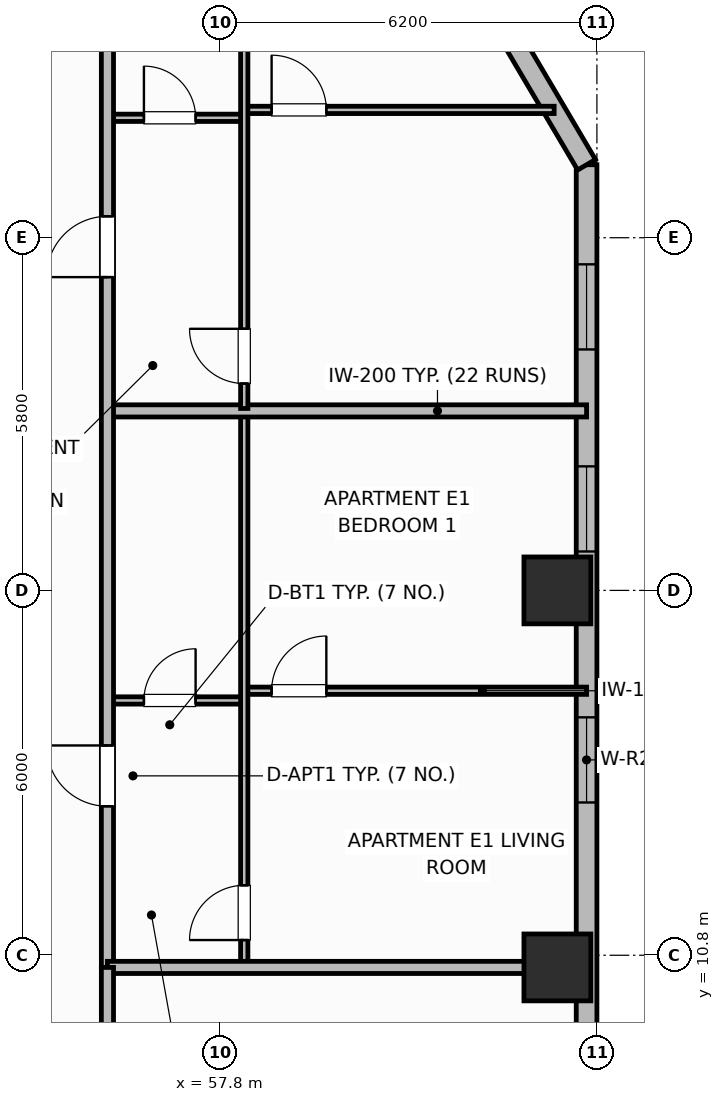
"""IFC4 building model, lengths in metres.
Left out: names, types, materials, properties, quantities, classifications, styles, units other than length and angle.
Written with IfcOpenShell. Run it as: python <this file> out.ifc"""

import sys

from ifc_helpers import new_model, si_unit, direction, frame, frame_2d, origin, origin_2d, place, context, subcontext, project, spatial, rectangle, extrude, element, fill, save


model = new_model("IFC4")
c1 = context("Model", 3, precision=1e-05, world=origin(), true_north=direction((0.0, 1.0)))
c2 = subcontext(c1, "Body", "Model", "MODEL_VIEW")
j1 = project(units=[si_unit("LENGTHUNIT", "METRE"), si_unit("PLANEANGLEUNIT", "RADIAN")], contexts=[c1])
p1 = place(None, origin())
s1 = spatial("IfcSite", under=j1, at=p1, CompositionType="ELEMENT")
p2 = place(p1, origin())
s2 = spatial("IfcBuilding", under=s1, at=p2, CompositionType="ELEMENT")
p3 = place(p2, frame((0.0, 0.0, 106.8)))
s3 = spatial("IfcBuildingStorey", under=s2, at=p3, CompositionType="ELEMENT", Elevation=106.8)
for number, where, z_axis, x_axis in (
    (1, (63.35, 10.6, 0.0), (0.0, 0.0, 1.0), (1.0, 0.0, 0.0)),
    (2, (63.35, 16.8, 0.0), (0.0, 0.0, 1.0), (1.0, 0.0, 0.0)),
):
    element("IfcColumn", number, at=place(p3, frame(where, z_axis=z_axis, x_axis=x_axis)), inside=s3, PredefinedType="COLUMN", context=c2, shape_type="SweptSolid", body=[
        extrude(rectangle(XDim=1.1, YDim=1.1, at=origin_2d()), origin(), (0.0, 0.0, 1.0), 3.7),
    ])
p4 = place(p3, frame((63.83, 9.0, 0.0), z_axis=(0.0, 0.0, 1.0), x_axis=(0.0, 1.0, 0.0)))
e3 = element("IfcWall", 3, at=p4, inside=s3, PredefinedType="SOLIDWALL", context=c2, shape_type="SweptSolid", body=[
    extrude(rectangle(XDim=14.8, YDim=0.34, at=frame_2d((7.4, 0.0))), origin(), (0.0, 0.0, 1.0), 2.7),
])
p5 = place(p4, frame((4.312, 0.0, 0.73)))
e4 = element("IfcOpeningElement", 4, at=p5, cuts=e3, PredefinedType="OPENING", context=c2, shape_type="SweptSolid", body=[
    extrude(rectangle(XDim=1.4, YDim=1.85, at=frame_2d((0.7, 0.925))), frame((0.0, 0.18, 0.0), z_axis=(0.0, -1.0, 0.0), x_axis=(1.0, 0.0, 0.0)), (0.0, 0.0, 1.0), 0.36),
])
p6 = place(p4, frame((8.44, 0.0, 0.69)))
e5 = element("IfcOpeningElement", 5, at=p6, cuts=e3, PredefinedType="OPENING", context=c2, shape_type="SweptSolid", body=[
    extrude(rectangle(XDim=1.4, YDim=1.85, at=frame_2d((0.7, 0.925))), frame((0.0, 0.18, 0.0), z_axis=(0.0, -1.0, 0.0), x_axis=(1.0, 0.0, 0.0)), (0.0, 0.0, 1.0), 0.36),
])
p7 = place(p4, frame((11.762, 0.0, 0.73)))
e6 = element("IfcOpeningElement", 6, at=p7, cuts=e3, PredefinedType="OPENING", context=c2, shape_type="SweptSolid", body=[
    extrude(rectangle(XDim=1.4, YDim=1.85, at=frame_2d((0.7, 0.925))), frame((0.0, 0.18, 0.0), z_axis=(0.0, -1.0, 0.0), x_axis=(1.0, 0.0, 0.0)), (0.0, 0.0, 1.0), 0.36),
])
p8 = place(p3, frame((63.83, 23.8, 0.0), z_axis=(0.0, 0.0, 1.0), x_axis=(-0.508751843651, 0.860913213734, 0.0)))
e7 = element("IfcWall", 7, at=p8, inside=s3, PredefinedType="SOLIDWALL", context=c2, shape_type="SweptSolid", body=[
    extrude(rectangle(XDim=2.555, YDim=0.34, at=frame_2d((1.278, 0.0))), origin(), (0.0, 0.0, 1.0), 2.7),
])
p9 = place(p3, frame((55.95, 14.99, 0.0), z_axis=(0.0, 0.0, 1.0), x_axis=(1.0, 0.0, 0.0)))
e8 = element("IfcWall", 8, at=p9, inside=s3, PredefinedType="PARTITIONING", context=c2, shape_type="SweptSolid", body=[
    extrude(rectangle(XDim=2.25, YDim=0.12, at=frame_2d((1.125, 0.0))), origin(), (0.0, 0.0, 1.0), 2.53),
])
p10 = place(p9, frame((0.6, 0.0, 0.0)))
e9 = element("IfcOpeningElement", 9, at=p10, cuts=e8, PredefinedType="OPENING", context=c2, shape_type="SweptSolid", body=[
    extrude(rectangle(XDim=0.85, YDim=2.1, at=frame_2d((0.425, 1.05))), frame((0.0, 0.07, 0.0), z_axis=(0.0, -1.0, 0.0), x_axis=(1.0, 0.0, 0.0)), (0.0, 0.0, 1.0), 0.14),
])
p11 = place(p3, frame((58.2, 15.15, 0.0), z_axis=(0.0, 0.0, 1.0), x_axis=(1.0, 0.0, 0.0)))
e10 = element("IfcWall", 10, at=p11, inside=s3, PredefinedType="PARTITIONING", context=c2, shape_type="SweptSolid", body=[
    extrude(rectangle(XDim=5.63, YDim=0.12, at=frame_2d((2.815, 0.0))), origin(), (0.0, 0.0, 1.0), 2.53),
])
p12 = place(p11, frame((0.45, 0.0, 0.0)))
e11 = element("IfcOpeningElement", 11, at=p12, cuts=e10, PredefinedType="OPENING", context=c2, shape_type="SweptSolid", body=[
    extrude(rectangle(XDim=0.9, YDim=2.1, at=frame_2d((0.45, 1.05))), frame((0.0, 0.07, 0.0), z_axis=(0.0, -1.0, 0.0), x_axis=(1.0, 0.0, 0.0)), (0.0, 0.0, 1.0), 0.14),
])
p13 = place(p3, frame((58.2, 10.64, 0.0), z_axis=(0.0, 0.0, 1.0), x_axis=(0.0, 1.0, 0.0)))
e12 = element("IfcWall", 12, at=p13, inside=s3, PredefinedType="PARTITIONING", context=c2, shape_type="SweptSolid", body=[
    extrude(rectangle(XDim=9.072, YDim=0.12, at=frame_2d((4.536, 0.0))), origin(), (0.0, 0.0, 1.0), 2.53),
])
p14 = place(p13, frame((0.41, 0.0, 0.0)))
e13 = element("IfcOpeningElement", 13, at=p14, cuts=e12, PredefinedType="OPENING", context=c2, shape_type="SweptSolid", body=[
    extrude(rectangle(XDim=0.9, YDim=2.1, at=frame_2d((0.45, 1.05))), frame((0.0, 0.07, 0.0), z_axis=(0.0, -1.0, 0.0), x_axis=(1.0, 0.0, 0.0)), (0.0, 0.0, 1.0), 0.14),
])
p15 = place(p3, frame((55.95, 19.752, 0.0), z_axis=(0.0, 0.0, 1.0), x_axis=(1.0, 0.0, 0.0)))
e14 = element("IfcWall", 14, at=p15, inside=s3, PredefinedType="PARTITIONING", context=c2, shape_type="SweptSolid", body=[
    extrude(rectangle(XDim=7.88, YDim=0.2, at=frame_2d((3.94, 0.0))), origin(), (0.0, 0.0, 1.0), 2.53),
])
p16 = place(p3, frame((55.95, 24.572, 0.0), z_axis=(0.0, 0.0, 1.0), x_axis=(1.0, 0.0, 0.0)))
e15 = element("IfcWall", 15, at=p16, inside=s3, PredefinedType="PARTITIONING", context=c2, shape_type="SweptSolid", body=[
    extrude(rectangle(XDim=2.25, YDim=0.12, at=frame_2d((1.125, 0.0))), origin(), (0.0, 0.0, 1.0), 2.53),
])
p17 = place(p16, frame((0.6, 0.0, 0.0)))
e16 = element("IfcOpeningElement", 16, at=p17, cuts=e15, PredefinedType="OPENING", context=c2, shape_type="SweptSolid", body=[
    extrude(rectangle(XDim=0.85, YDim=2.1, at=frame_2d((0.425, 1.05))), frame((0.0, 0.07, 0.0), z_axis=(0.0, -1.0, 0.0), x_axis=(1.0, 0.0, 0.0)), (0.0, 0.0, 1.0), 0.14),
])
p18 = place(p3, frame((58.2, 24.702, 0.0), z_axis=(0.0, 0.0, 1.0), x_axis=(1.0, 0.0, 0.0)))
e17 = element("IfcWall", 17, at=p18, inside=s3, PredefinedType="PARTITIONING", context=c2, shape_type="SweptSolid", body=[
    extrude(rectangle(XDim=5.097, YDim=0.12, at=frame_2d((2.549, 0.0))), origin(), (0.0, 0.0, 1.0), 2.53),
])
p19 = place(p18, frame((0.45, 0.0, 0.0)))
e18 = element("IfcOpeningElement", 18, at=p19, cuts=e17, PredefinedType="OPENING", context=c2, shape_type="SweptSolid", body=[
    extrude(rectangle(XDim=0.9, YDim=2.1, at=frame_2d((0.45, 1.05))), frame((0.0, 0.07, 0.0), z_axis=(0.0, -1.0, 0.0), x_axis=(1.0, 0.0, 0.0)), (0.0, 0.0, 1.0), 0.14),
])
p20 = place(p3, frame((58.2, 19.792, 0.0), z_axis=(0.0, 0.0, 1.0), x_axis=(0.0, 1.0, 0.0)))
e19 = element("IfcWall", 19, at=p20, inside=s3, PredefinedType="PARTITIONING", context=c2, shape_type="SweptSolid", body=[
    extrude(rectangle(XDim=9.968, YDim=0.12, at=frame_2d((4.984, 0.0))), origin(), (0.0, 0.0, 1.0), 2.53),
])
p21 = place(p20, frame((0.41, 0.0, 0.0)))
e20 = element("IfcOpeningElement", 20, at=p21, cuts=e19, PredefinedType="OPENING", context=c2, shape_type="SweptSolid", body=[
    extrude(rectangle(XDim=0.9, YDim=2.1, at=frame_2d((0.45, 1.05))), frame((0.0, 0.07, 0.0), z_axis=(0.0, -1.0, 0.0), x_axis=(1.0, 0.0, 0.0)), (0.0, 0.0, 1.0), 0.14),
])
p22 = place(p3, frame((55.95, 10.6, 0.0), z_axis=(0.0, 0.0, 1.0), x_axis=(0.0, 1.0, 0.0)))
e21 = element("IfcWall", 21, at=p22, inside=s3, PredefinedType="PARTITIONING", context=c2, shape_type="SweptSolid", body=[
    extrude(rectangle(XDim=35.2, YDim=0.2, at=frame_2d((17.6, 0.0))), origin(), (0.0, 0.0, 1.0), 2.53),
])
p23 = place(p22, frame((2.65, 0.0, 0.0)))
e22 = element("IfcOpeningElement", 22, at=p23, cuts=e21, PredefinedType="OPENING", context=c2, shape_type="SweptSolid", body=[
    extrude(rectangle(XDim=1.0, YDim=2.15, at=frame_2d((0.5, 1.075))), frame((0.0, 0.11, 0.0), z_axis=(0.0, -1.0, 0.0), x_axis=(1.0, 0.0, 0.0)), (0.0, 0.0, 1.0), 0.22),
])
p24 = place(p22, frame((11.352, 0.0, 0.0)))
e23 = element("IfcOpeningElement", 23, at=p24, cuts=e21, PredefinedType="OPENING", context=c2, shape_type="SweptSolid", body=[
    extrude(rectangle(XDim=1.0, YDim=2.15, at=frame_2d((0.5, 1.075))), frame((0.0, 0.11, 0.0), z_axis=(0.0, -1.0, 0.0), x_axis=(1.0, 0.0, 0.0)), (0.0, 0.0, 1.0), 0.22),
])
p25 = place(p22, frame((21.37, 0.0, 0.0)))
e24 = element("IfcOpeningElement", 24, at=p25, cuts=e21, PredefinedType="OPENING", context=c2, shape_type="SweptSolid", body=[
    extrude(rectangle(XDim=1.0, YDim=2.15, at=frame_2d((0.5, 1.075))), frame((0.0, 0.11, 0.0), z_axis=(0.0, -1.0, 0.0), x_axis=(1.0, 0.0, 0.0)), (0.0, 0.0, 1.0), 0.22),
])
p26 = place(p22, frame((27.302, 0.0, 0.0)))
e25 = element("IfcOpeningElement", 25, at=p26, cuts=e21, PredefinedType="OPENING", context=c2, shape_type="SweptSolid", body=[
    extrude(rectangle(XDim=1.0, YDim=2.15, at=frame_2d((0.5, 1.075))), frame((0.0, 0.11, 0.0), z_axis=(0.0, -1.0, 0.0), x_axis=(1.0, 0.0, 0.0)), (0.0, 0.0, 1.0), 0.22),
])
p27 = place(p3, frame((55.95, 10.6, 0.0), z_axis=(0.0, 0.0, 1.0), x_axis=(1.0, 0.0, 0.0)))
e26 = element("IfcWall", 26, at=p27, inside=s3, PredefinedType="PARTITIONING", context=c2, shape_type="SweptSolid", body=[
    extrude(rectangle(XDim=7.46, YDim=0.2, at=frame_2d((3.73, 0.0))), origin(), (0.0, 0.0, 1.0), 2.53),
])
p28 = place(p3, frame((55.95, 4.97, 0.0), z_axis=(0.0, 0.0, 1.0), x_axis=(0.0, 1.0, 0.0)))
e27 = element("IfcWall", 27, at=p28, inside=s3, PredefinedType="PARTITIONING", context=c2, shape_type="SweptSolid", body=[
    extrude(rectangle(XDim=5.63, YDim=0.2, at=frame_2d((2.815, 0.0))), origin(), (0.0, 0.0, 1.0), 2.53),
])
p29 = place(p5, origin())
e28 = element("IfcWindow", 28, at=p29, inside=s3, PartitioningType="SINGLE_PANEL", PredefinedType="WINDOW", context=c2, shape_type="SweptSolid", body=[
    extrude(rectangle(XDim=1.4, YDim=1.85, at=frame_2d((0.7, 0.925))), frame((0.0, 0.03, 0.0), z_axis=(0.0, -1.0, 0.0), x_axis=(1.0, 0.0, 0.0)), (0.0, 0.0, 1.0), 0.06),
])
fill(e4, e28)
p30 = place(p6, origin())
e29 = element("IfcWindow", 29, at=p30, inside=s3, PartitioningType="SINGLE_PANEL", PredefinedType="WINDOW", context=c2, shape_type="SweptSolid", body=[
    extrude(rectangle(XDim=1.4, YDim=1.85, at=frame_2d((0.7, 0.925))), frame((0.0, 0.03, 0.0), z_axis=(0.0, -1.0, 0.0), x_axis=(1.0, 0.0, 0.0)), (0.0, 0.0, 1.0), 0.06),
])
fill(e5, e29)
p31 = place(p7, origin())
e30 = element("IfcWindow", 30, at=p31, inside=s3, PartitioningType="SINGLE_PANEL", PredefinedType="WINDOW", context=c2, shape_type="SweptSolid", body=[
    extrude(rectangle(XDim=1.4, YDim=1.85, at=frame_2d((0.7, 0.925))), frame((0.0, 0.03, 0.0), z_axis=(0.0, -1.0, 0.0), x_axis=(1.0, 0.0, 0.0)), (0.0, 0.0, 1.0), 0.06),
])
fill(e6, e30)
p32 = place(p10, origin())
e31 = element("IfcDoor", 31, at=p32, inside=s3, OperationType="SINGLE_SWING_RIGHT", PredefinedType="DOOR", context=c2, shape_type="SweptSolid", body=[
    extrude(rectangle(XDim=0.85, YDim=2.1, at=frame_2d((0.425, 1.05))), frame((0.0, 0.025, 0.0), z_axis=(0.0, -1.0, 0.0), x_axis=(1.0, 0.0, 0.0)), (0.0, 0.0, 1.0), 0.05),
])
fill(e9, e31)
p33 = place(p12, origin())
e32 = element("IfcDoor", 32, at=p33, inside=s3, OperationType="SINGLE_SWING_RIGHT", PredefinedType="DOOR", context=c2, shape_type="SweptSolid", body=[
    extrude(rectangle(XDim=0.9, YDim=2.1, at=frame_2d((0.45, 1.05))), frame((0.0, 0.025, 0.0), z_axis=(0.0, -1.0, 0.0), x_axis=(1.0, 0.0, 0.0)), (0.0, 0.0, 1.0), 0.05),
])
fill(e11, e32)
p34 = place(p14, origin())
e33 = element("IfcDoor", 33, at=p34, inside=s3, OperationType="SINGLE_SWING_LEFT", PredefinedType="DOOR", context=c2, shape_type="SweptSolid", body=[
    extrude(rectangle(XDim=0.9, YDim=2.1, at=frame_2d((0.45, 1.05))), frame((0.0, 0.025, 0.0), z_axis=(0.0, -1.0, 0.0), x_axis=(1.0, 0.0, 0.0)), (0.0, 0.0, 1.0), 0.05),
])
fill(e13, e33)
p35 = place(p17, origin())
e34 = element("IfcDoor", 34, at=p35, inside=s3, OperationType="SINGLE_SWING_LEFT", PredefinedType="DOOR", context=c2, shape_type="SweptSolid", body=[
    extrude(rectangle(XDim=0.85, YDim=2.1, at=frame_2d((0.425, 1.05))), frame((0.0, 0.025, 0.0), z_axis=(0.0, -1.0, 0.0), x_axis=(1.0, 0.0, 0.0)), (0.0, 0.0, 1.0), 0.05),
])
fill(e16, e34)
p36 = place(p19, origin())
e35 = element("IfcDoor", 35, at=p36, inside=s3, OperationType="SINGLE_SWING_LEFT", PredefinedType="DOOR", context=c2, shape_type="SweptSolid", body=[
    extrude(rectangle(XDim=0.9, YDim=2.1, at=frame_2d((0.45, 1.05))), frame((0.0, 0.025, 0.0), z_axis=(0.0, -1.0, 0.0), x_axis=(1.0, 0.0, 0.0)), (0.0, 0.0, 1.0), 0.05),
])
fill(e18, e35)
p37 = place(p21, origin())
e36 = element("IfcDoor", 36, at=p37, inside=s3, OperationType="SINGLE_SWING_RIGHT", PredefinedType="DOOR", context=c2, shape_type="SweptSolid", body=[
    extrude(rectangle(XDim=0.9, YDim=2.1, at=frame_2d((0.45, 1.05))), frame((0.0, 0.025, 0.0), z_axis=(0.0, -1.0, 0.0), x_axis=(1.0, 0.0, 0.0)), (0.0, 0.0, 1.0), 0.05),
])
fill(e20, e36)
p38 = place(p23, origin())
e37 = element("IfcDoor", 37, at=p38, inside=s3, OperationType="SINGLE_SWING_RIGHT", PredefinedType="DOOR", context=c2, shape_type="SweptSolid", body=[
    extrude(rectangle(XDim=1.0, YDim=2.15, at=frame_2d((0.5, 1.075))), frame((0.0, 0.025, 0.0), z_axis=(0.0, -1.0, 0.0), x_axis=(1.0, 0.0, 0.0)), (0.0, 0.0, 1.0), 0.05),
])
fill(e22, e37)
p39 = place(p24, origin())
e38 = element("IfcDoor", 38, at=p39, inside=s3, OperationType="SINGLE_SWING_LEFT", PredefinedType="DOOR", context=c2, shape_type="SweptSolid", body=[
    extrude(rectangle(XDim=1.0, YDim=2.15, at=frame_2d((0.5, 1.075))), frame((0.0, 0.025, 0.0), z_axis=(0.0, -1.0, 0.0), x_axis=(1.0, 0.0, 0.0)), (0.0, 0.0, 1.0), 0.05),
])
fill(e23, e38)
save(model, sys.argv[1])
